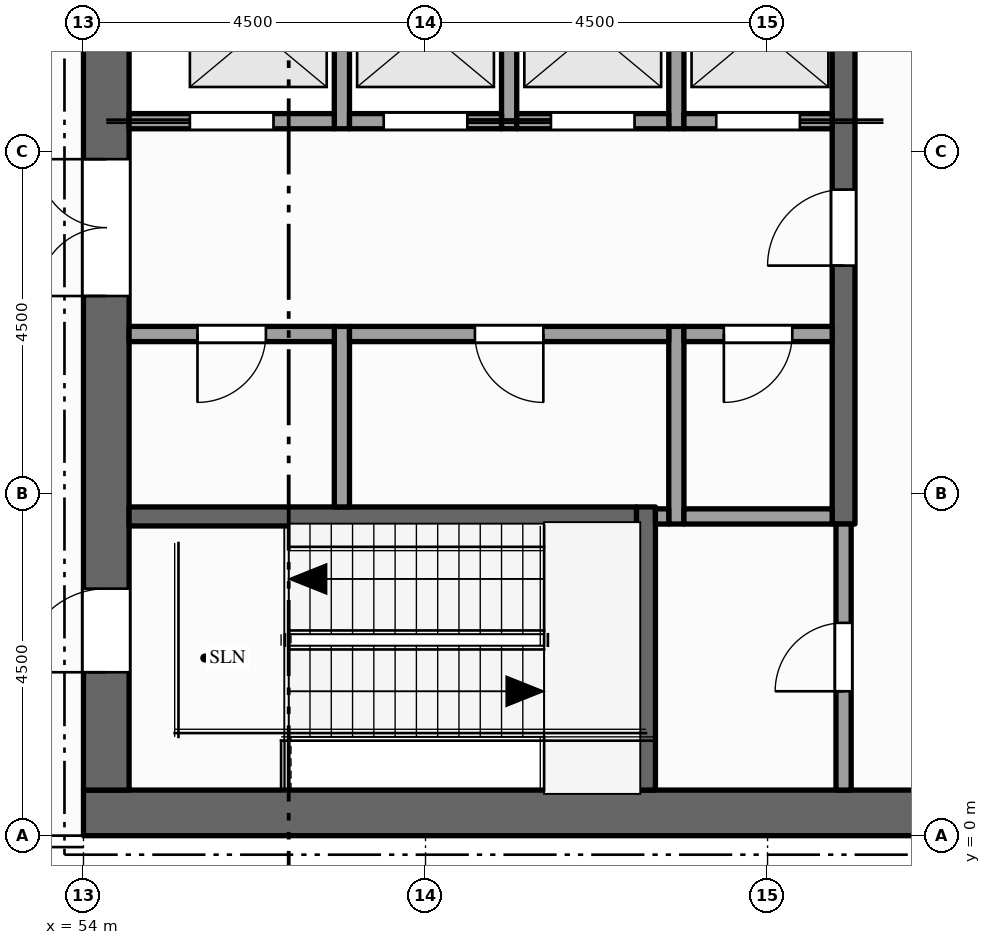
"""IFC4 building model, lengths in metres.
Left out: names, types, materials, properties, quantities, classifications, styles, units other than length and angle.
Written with IfcOpenShell. Run it as: python <this file> out.ifc"""

import sys

from ifc_helpers import new_model, si_unit, direction, frame, frame_2d, origin, place, context, subcontext, project, spatial, rectangle, extrude, element, fill, save


model = new_model("IFC4")
c1 = context("Model", 3, precision=1e-05, world=origin(), true_north=direction((0.0, 1.0)))
c2 = subcontext(c1, "Body", "Model", "MODEL_VIEW")
j1 = project(units=[si_unit("LENGTHUNIT", "METRE"), si_unit("PLANEANGLEUNIT", "RADIAN")], contexts=[c1])
p1 = place(None, origin())
s1 = spatial("IfcSite", under=j1, at=p1, CompositionType="ELEMENT")
p2 = place(p1, origin())
s2 = spatial("IfcBuilding", under=s1, at=p2, CompositionType="ELEMENT")
p3 = place(p2, frame((0.0, 0.0, 314.0)))
s3 = spatial("IfcBuildingStorey", under=s2, at=p3, CompositionType="ELEMENT", Elevation=314.0)
p4 = place(p3, frame((67.5, 0.3, -0.15), z_axis=(0.0, 0.0, 1.0), x_axis=(-1.0, 0.0, 0.0)))
e1 = element("IfcWall", 1, at=p4, inside=s3, PredefinedType="SHEAR", context=c2, shape_type="SweptSolid", body=[
    extrude(rectangle(XDim=13.5, YDim=0.6, at=frame_2d((6.75, 0.0))), origin(), (0.0, 0.0, 1.0), 4.5),
])
p5 = place(p3, frame((54.3, 0.6, -0.15), z_axis=(0.0, 0.0, 1.0), x_axis=(0.0, 1.0, 0.0)))
e2 = element("IfcWall", 2, at=p5, inside=s3, PredefinedType="SHEAR", context=c2, shape_type="SweptSolid", body=[
    extrude(rectangle(XDim=21.3, YDim=0.6, at=frame_2d((10.65, 0.0))), origin(), (0.0, 0.0, 1.0), 4.5),
])
p6 = place(p5, frame((6.5, 0.0, 0.15)))
e3 = element("IfcOpeningElement", 3, at=p6, cuts=e2, PredefinedType="OPENING", context=c2, shape_type="SweptSolid", body=[
    extrude(rectangle(XDim=1.8, YDim=2.1, at=frame_2d((0.9, 1.05))), frame((0.0, 0.31, 0.0), z_axis=(0.0, -1.0, 0.0), x_axis=(1.0, 0.0, 0.0)), (0.0, 0.0, 1.0), 0.62),
])
p7 = place(p5, frame((12.55, 0.0, 0.15)))
e4 = element("IfcOpeningElement", 4, at=p7, cuts=e2, PredefinedType="OPENING", context=c2, shape_type="SweptSolid", body=[
    extrude(rectangle(XDim=1.1, YDim=2.1, at=frame_2d((0.55, 1.05))), frame((0.0, 0.31, 0.0), z_axis=(0.0, -1.0, 0.0), x_axis=(1.0, 0.0, 0.0)), (0.0, 0.0, 1.0), 0.62),
])
p8 = place(p5, frame((1.55, 0.0, 0.15)))
e5 = element("IfcOpeningElement", 5, at=p8, cuts=e2, PredefinedType="OPENING", context=c2, shape_type="SweptSolid", body=[
    extrude(rectangle(XDim=1.1, YDim=2.1, at=frame_2d((0.55, 1.05))), frame((0.0, 0.31, 0.0), z_axis=(0.0, -1.0, 0.0), x_axis=(1.0, 0.0, 0.0)), (0.0, 0.0, 1.0), 0.62),
])
p9 = place(p5, frame((18.75, 0.0, 0.15)))
e6 = element("IfcOpeningElement", 6, at=p9, cuts=e2, PredefinedType="OPENING", context=c2, shape_type="SweptSolid", body=[
    extrude(rectangle(XDim=1.1, YDim=2.1, at=frame_2d((0.55, 1.05))), frame((0.0, 0.31, 0.0), z_axis=(0.0, -1.0, 0.0), x_axis=(1.0, 0.0, 0.0)), (0.0, 0.0, 1.0), 0.62),
])
p10 = place(p3, frame((57.4, 4.325, 0.0), z_axis=(0.0, 0.0, 1.0), x_axis=(0.0, 1.0, 0.0)))
e7 = element("IfcWall", 7, at=p10, inside=s3, PredefinedType="PARTITIONING", context=c2, shape_type="SweptSolid", body=[
    extrude(rectangle(XDim=2.375, YDim=0.2, at=frame_2d((1.188, 0.0))), origin(), (0.0, 0.0, 1.0), 4.35),
])
for number, where, z_axis, x_axis in (
    (8, (57.4, 9.3, 0.0), (0.0, 0.0, 1.0), (0.0, 1.0, 0.0)),
    (9, (59.6, 9.3, 0.0), (0.0, 0.0, 1.0), (0.0, 1.0, 0.0)),
):
    element("IfcWall", number, at=place(p3, frame(where, z_axis=z_axis, x_axis=x_axis)), inside=s3, PredefinedType="SOLIDWALL", context=c2, shape_type="SweptSolid", body=[
        extrude(rectangle(XDim=2.6, YDim=0.2, at=frame_2d((1.3, 0.0))), origin(), (0.0, 0.0, 1.0), 4.35),
    ])
p11 = place(p3, frame((61.4, 0.6, 0.0), z_axis=(0.0, 0.0, 1.0), x_axis=(0.0, 1.0, 0.0)))
e10 = element("IfcWall", 10, at=p11, inside=s3, PredefinedType="SHEAR", context=c2, shape_type="SweptSolid", body=[
    extrude(rectangle(XDim=3.725, YDim=0.25, at=frame_2d((1.862, 0.0))), origin(), (0.0, 0.0, 1.0), 4.35),
])
p12 = place(p3, frame((61.8, 4.1, 0.0), z_axis=(0.0, 0.0, 1.0), x_axis=(0.0, 1.0, 0.0)))
e11 = element("IfcWall", 11, at=p12, inside=s3, PredefinedType="PARTITIONING", context=c2, shape_type="SweptSolid", body=[
    extrude(rectangle(XDim=2.6, YDim=0.2, at=frame_2d((1.3, 0.0))), origin(), (0.0, 0.0, 1.0), 4.35),
])
p13 = place(p3, frame((61.8, 9.3, 0.0), z_axis=(0.0, 0.0, 1.0), x_axis=(0.0, 1.0, 0.0)))
e12 = element("IfcWall", 12, at=p13, inside=s3, PredefinedType="SOLIDWALL", context=c2, shape_type="SweptSolid", body=[
    extrude(rectangle(XDim=2.6, YDim=0.2, at=frame_2d((1.3, 0.0))), origin(), (0.0, 0.0, 1.0), 4.35),
])
p14 = place(p3, frame((64.0, 0.6, 0.0), z_axis=(0.0, 0.0, 1.0), x_axis=(0.0, 1.0, 0.0)))
e13 = element("IfcWall", 13, at=p14, inside=s3, PredefinedType="PARTITIONING", context=c2, shape_type="SweptSolid", body=[
    extrude(rectangle(XDim=3.5, YDim=0.2, at=frame_2d((1.75, 0.0))), origin(), (0.0, 0.0, 1.0), 4.35),
])
p15 = place(p14, frame((1.3, 0.0, 0.0)))
e14 = element("IfcOpeningElement", 14, at=p15, cuts=e13, PredefinedType="OPENING", context=c2, shape_type="SweptSolid", body=[
    extrude(rectangle(XDim=0.9, YDim=2.1, at=frame_2d((0.45, 1.05))), frame((0.0, 0.11, 0.0), z_axis=(0.0, -1.0, 0.0), x_axis=(1.0, 0.0, 0.0)), (0.0, 0.0, 1.0), 0.22),
])
p16 = place(p3, frame((64.0, 4.1, 0.0), z_axis=(0.0, 0.0, 1.0), x_axis=(0.0, 1.0, 0.0)))
e15 = element("IfcWall", 15, at=p16, inside=s3, PredefinedType="SHEAR", context=c2, shape_type="SweptSolid", body=[
    extrude(rectangle(XDim=14.5, YDim=0.3, at=frame_2d((7.25, 0.0))), origin(), (0.0, 0.0, 1.0), 4.35),
])
p17 = place(p16, frame((3.4, 0.0, 0.0)))
e16 = element("IfcOpeningElement", 16, at=p17, cuts=e15, PredefinedType="OPENING", context=c2, shape_type="SweptSolid", body=[
    extrude(rectangle(XDim=1.0, YDim=2.1, at=frame_2d((0.5, 1.05))), frame((0.0, 0.16, 0.0), z_axis=(0.0, -1.0, 0.0), x_axis=(1.0, 0.0, 0.0)), (0.0, 0.0, 1.0), 0.32),
])
p18 = place(p16, frame((9.1, 0.0, 0.0)))
e17 = element("IfcOpeningElement", 17, at=p18, cuts=e15, PredefinedType="OPENING", context=c2, shape_type="SweptSolid", body=[
    extrude(rectangle(XDim=1.0, YDim=2.1, at=frame_2d((0.5, 1.05))), frame((0.0, 0.16, 0.0), z_axis=(0.0, -1.0, 0.0), x_axis=(1.0, 0.0, 0.0)), (0.0, 0.0, 1.0), 0.32),
])
p19 = place(p3, frame((54.6, 4.2, 0.0), z_axis=(0.0, 0.0, 1.0), x_axis=(1.0, 0.0, 0.0)))
e18 = element("IfcWall", 18, at=p19, inside=s3, PredefinedType="SHEAR", context=c2, shape_type="SweptSolid", body=[
    extrude(rectangle(XDim=6.675, YDim=0.25, at=frame_2d((3.337, 0.0))), origin(), (0.0, 0.0, 1.0), 4.35),
])
p20 = place(p3, frame((61.525, 4.2, 0.0), z_axis=(0.0, 0.0, 1.0), x_axis=(1.0, 0.0, 0.0)))
e19 = element("IfcWall", 19, at=p20, inside=s3, PredefinedType="PARTITIONING", context=c2, shape_type="SweptSolid", body=[
    extrude(rectangle(XDim=0.175, YDim=0.2, at=frame_2d((0.087, 0.0))), origin(), (0.0, 0.0, 1.0), 4.35),
])
p21 = place(p3, frame((61.9, 4.2, 0.0), z_axis=(0.0, 0.0, 1.0), x_axis=(1.0, 0.0, 0.0)))
e20 = element("IfcWall", 20, at=p21, inside=s3, PredefinedType="PARTITIONING", context=c2, shape_type="SweptSolid", body=[
    extrude(rectangle(XDim=1.95, YDim=0.2, at=frame_2d((0.975, 0.0))), origin(), (0.0, 0.0, 1.0), 4.35),
])
p22 = place(p3, frame((54.6, 6.6, 0.0), z_axis=(0.0, 0.0, 1.0), x_axis=(1.0, 0.0, 0.0)))
e21 = element("IfcWall", 21, at=p22, inside=s3, PredefinedType="PARTITIONING", context=c2, shape_type="SweptSolid", body=[
    extrude(rectangle(XDim=2.7, YDim=0.2, at=frame_2d((1.35, 0.0))), origin(), (0.0, 0.0, 1.0), 4.35),
])
p23 = place(p22, frame((0.9, 0.0, 0.0)))
e22 = element("IfcOpeningElement", 22, at=p23, cuts=e21, PredefinedType="OPENING", context=c2, shape_type="SweptSolid", body=[
    extrude(rectangle(XDim=0.9, YDim=2.1, at=frame_2d((0.45, 1.05))), frame((0.0, 0.11, 0.0), z_axis=(0.0, -1.0, 0.0), x_axis=(1.0, 0.0, 0.0)), (0.0, 0.0, 1.0), 0.22),
])
p24 = place(p3, frame((57.5, 6.6, 0.0), z_axis=(0.0, 0.0, 1.0), x_axis=(1.0, 0.0, 0.0)))
e23 = element("IfcWall", 23, at=p24, inside=s3, PredefinedType="PARTITIONING", context=c2, shape_type="SweptSolid", body=[
    extrude(rectangle(XDim=4.2, YDim=0.2, at=frame_2d((2.1, 0.0))), origin(), (0.0, 0.0, 1.0), 4.35),
])
p25 = place(p24, frame((1.65, 0.0, 0.0)))
e24 = element("IfcOpeningElement", 24, at=p25, cuts=e23, PredefinedType="OPENING", context=c2, shape_type="SweptSolid", body=[
    extrude(rectangle(XDim=0.9, YDim=2.1, at=frame_2d((0.45, 1.05))), frame((0.0, 0.11, 0.0), z_axis=(0.0, -1.0, 0.0), x_axis=(1.0, 0.0, 0.0)), (0.0, 0.0, 1.0), 0.22),
])
p26 = place(p3, frame((61.9, 6.6, 0.0), z_axis=(0.0, 0.0, 1.0), x_axis=(1.0, 0.0, 0.0)))
e25 = element("IfcWall", 25, at=p26, inside=s3, PredefinedType="PARTITIONING", context=c2, shape_type="SweptSolid", body=[
    extrude(rectangle(XDim=1.95, YDim=0.2, at=frame_2d((0.975, 0.0))), origin(), (0.0, 0.0, 1.0), 4.35),
])
p27 = place(p26, frame((0.525, 0.0, 0.0)))
e26 = element("IfcOpeningElement", 26, at=p27, cuts=e25, PredefinedType="OPENING", context=c2, shape_type="SweptSolid", body=[
    extrude(rectangle(XDim=0.9, YDim=2.1, at=frame_2d((0.45, 1.05))), frame((0.0, 0.11, 0.0), z_axis=(0.0, -1.0, 0.0), x_axis=(1.0, 0.0, 0.0)), (0.0, 0.0, 1.0), 0.22),
])
p28 = place(p3, frame((54.6, 9.4, 0.0), z_axis=(0.0, 0.0, 1.0), x_axis=(1.0, 0.0, 0.0)))
e27 = element("IfcWall", 27, at=p28, inside=s3, PredefinedType="SOLIDWALL", context=c2, shape_type="SweptSolid", body=[
    extrude(rectangle(XDim=2.7, YDim=0.2, at=frame_2d((1.35, 0.0))), origin(), (0.0, 0.0, 1.0), 4.35),
])
p29 = place(p28, frame((0.8, 0.0, 0.012)))
e28 = element("IfcOpeningElement", 28, at=p29, cuts=e27, PredefinedType="OPENING", context=c2, shape_type="SweptSolid", body=[
    extrude(rectangle(XDim=1.1, YDim=2.1, at=frame_2d((0.55, 1.05))), frame((0.0, 0.11, 0.0), z_axis=(0.0, -1.0, 0.0), x_axis=(1.0, 0.0, 0.0)), (0.0, 0.0, 1.0), 0.22),
])
p30 = place(p3, frame((57.5, 9.4, 0.0), z_axis=(0.0, 0.0, 1.0), x_axis=(1.0, 0.0, 0.0)))
e29 = element("IfcWall", 29, at=p30, inside=s3, PredefinedType="SOLIDWALL", context=c2, shape_type="SweptSolid", body=[
    extrude(rectangle(XDim=2.0, YDim=0.2, at=frame_2d((1.0, 0.0))), origin(), (0.0, 0.0, 1.0), 4.35),
])
p31 = place(p30, frame((0.45, 0.0, 0.012)))
e30 = element("IfcOpeningElement", 30, at=p31, cuts=e29, PredefinedType="OPENING", context=c2, shape_type="SweptSolid", body=[
    extrude(rectangle(XDim=1.1, YDim=2.1, at=frame_2d((0.55, 1.05))), frame((0.0, 0.11, 0.0), z_axis=(0.0, -1.0, 0.0), x_axis=(1.0, 0.0, 0.0)), (0.0, 0.0, 1.0), 0.22),
])
p32 = place(p3, frame((59.7, 9.4, 0.0), z_axis=(0.0, 0.0, 1.0), x_axis=(1.0, 0.0, 0.0)))
e31 = element("IfcWall", 31, at=p32, inside=s3, PredefinedType="SOLIDWALL", context=c2, shape_type="SweptSolid", body=[
    extrude(rectangle(XDim=2.0, YDim=0.2, at=frame_2d((1.0, 0.0))), origin(), (0.0, 0.0, 1.0), 4.35),
])
p33 = place(p32, frame((0.45, 0.0, 0.012)))
e32 = element("IfcOpeningElement", 32, at=p33, cuts=e31, PredefinedType="OPENING", context=c2, shape_type="SweptSolid", body=[
    extrude(rectangle(XDim=1.1, YDim=2.1, at=frame_2d((0.55, 1.05))), frame((0.0, 0.11, 0.0), z_axis=(0.0, -1.0, 0.0), x_axis=(1.0, 0.0, 0.0)), (0.0, 0.0, 1.0), 0.22),
])
p34 = place(p3, frame((61.9, 9.4, 0.0), z_axis=(0.0, 0.0, 1.0), x_axis=(1.0, 0.0, 0.0)))
e33 = element("IfcWall", 33, at=p34, inside=s3, PredefinedType="SOLIDWALL", context=c2, shape_type="SweptSolid", body=[
    extrude(rectangle(XDim=1.95, YDim=0.2, at=frame_2d((0.975, 0.0))), origin(), (0.0, 0.0, 1.0), 4.35),
])
p35 = place(p34, frame((0.425, 0.0, 0.012)))
e34 = element("IfcOpeningElement", 34, at=p35, cuts=e33, PredefinedType="OPENING", context=c2, shape_type="SweptSolid", body=[
    extrude(rectangle(XDim=1.1, YDim=2.1, at=frame_2d((0.55, 1.05))), frame((0.0, 0.11, 0.0), z_axis=(0.0, -1.0, 0.0), x_axis=(1.0, 0.0, 0.0)), (0.0, 0.0, 1.0), 0.22),
])
p36 = place(p29, origin())
e35 = element("IfcDoor", 35, at=p36, inside=s3, OperationType="SLIDING_TO_LEFT", PredefinedType="DOOR", context=c2, shape_type="SweptSolid", body=[
    extrude(rectangle(XDim=1.1, YDim=2.1, at=frame_2d((0.55, 1.05))), frame((0.0, 0.025, 0.0), z_axis=(0.0, -1.0, 0.0), x_axis=(1.0, 0.0, 0.0)), (0.0, 0.0, 1.0), 0.05),
])
fill(e28, e35)
p37 = place(p31, origin())
e36 = element("IfcDoor", 36, at=p37, inside=s3, OperationType="SLIDING_TO_RIGHT", PredefinedType="DOOR", context=c2, shape_type="SweptSolid", body=[
    extrude(rectangle(XDim=1.1, YDim=2.1, at=frame_2d((0.55, 1.05))), frame((0.0, 0.025, 0.0), z_axis=(0.0, -1.0, 0.0), x_axis=(1.0, 0.0, 0.0)), (0.0, 0.0, 1.0), 0.05),
])
fill(e30, e36)
p38 = place(p33, origin())
e37 = element("IfcDoor", 37, at=p38, inside=s3, OperationType="SLIDING_TO_LEFT", PredefinedType="DOOR", context=c2, shape_type="SweptSolid", body=[
    extrude(rectangle(XDim=1.1, YDim=2.1, at=frame_2d((0.55, 1.05))), frame((0.0, 0.025, 0.0), z_axis=(0.0, -1.0, 0.0), x_axis=(1.0, 0.0, 0.0)), (0.0, 0.0, 1.0), 0.05),
])
fill(e32, e37)
p39 = place(p35, origin())
e38 = element("IfcDoor", 38, at=p39, inside=s3, OperationType="SLIDING_TO_RIGHT", PredefinedType="DOOR", context=c2, shape_type="SweptSolid", body=[
    extrude(rectangle(XDim=1.1, YDim=2.1, at=frame_2d((0.55, 1.05))), frame((0.0, 0.025, 0.0), z_axis=(0.0, -1.0, 0.0), x_axis=(1.0, 0.0, 0.0)), (0.0, 0.0, 1.0), 0.05),
])
fill(e34, e38)
p40 = place(p6, origin())
e39 = element("IfcDoor", 39, at=p40, inside=s3, OperationType="DOUBLE_DOOR_SINGLE_SWING", PredefinedType="DOOR", context=c2, shape_type="SweptSolid", body=[
    extrude(rectangle(XDim=1.8, YDim=2.1, at=frame_2d((0.9, 1.05))), frame((0.0, 0.025, 0.0), z_axis=(0.0, -1.0, 0.0), x_axis=(1.0, 0.0, 0.0)), (0.0, 0.0, 1.0), 0.05),
])
fill(e3, e39)
p41 = place(p17, origin())
e40 = element("IfcDoor", 40, at=p41, inside=s3, OperationType="SINGLE_SWING_LEFT", PredefinedType="DOOR", context=c2, shape_type="SweptSolid", body=[
    extrude(rectangle(XDim=1.0, YDim=2.1, at=frame_2d((0.5, 1.05))), frame((0.0, 0.025, 0.0), z_axis=(0.0, -1.0, 0.0), x_axis=(1.0, 0.0, 0.0)), (0.0, 0.0, 1.0), 0.05),
])
fill(e16, e40)
p42 = place(p8, origin())
e41 = element("IfcDoor", 41, at=p42, inside=s3, OperationType="SINGLE_SWING_LEFT", PredefinedType="DOOR", context=c2, shape_type="SweptSolid", body=[
    extrude(rectangle(XDim=1.1, YDim=2.1, at=frame_2d((0.55, 1.05))), frame((0.0, 0.025, 0.0), z_axis=(0.0, -1.0, 0.0), x_axis=(1.0, 0.0, 0.0)), (0.0, 0.0, 1.0), 0.05),
])
fill(e5, e41)
p43 = place(p15, origin())
e42 = element("IfcDoor", 42, at=p43, inside=s3, OperationType="SINGLE_SWING_LEFT", PredefinedType="DOOR", context=c2, shape_type="SweptSolid", body=[
    extrude(rectangle(XDim=0.9, YDim=2.1, at=frame_2d((0.45, 1.05))), frame((0.0, 0.025, 0.0), z_axis=(0.0, -1.0, 0.0), x_axis=(1.0, 0.0, 0.0)), (0.0, 0.0, 1.0), 0.05),
])
fill(e14, e42)
p44 = place(p23, origin())
e43 = element("IfcDoor", 43, at=p44, inside=s3, OperationType="SINGLE_SWING_LEFT", PredefinedType="DOOR", context=c2, shape_type="SweptSolid", body=[
    extrude(rectangle(XDim=0.9, YDim=2.1, at=frame_2d((0.45, 1.05))), frame((0.0, 0.025, 0.0), z_axis=(0.0, -1.0, 0.0), x_axis=(1.0, 0.0, 0.0)), (0.0, 0.0, 1.0), 0.05),
])
fill(e22, e43)
p45 = place(p25, origin())
e44 = element("IfcDoor", 44, at=p45, inside=s3, OperationType="SINGLE_SWING_RIGHT", PredefinedType="DOOR", context=c2, shape_type="SweptSolid", body=[
    extrude(rectangle(XDim=0.9, YDim=2.1, at=frame_2d((0.45, 1.05))), frame((0.0, 0.025, 0.0), z_axis=(0.0, -1.0, 0.0), x_axis=(1.0, 0.0, 0.0)), (0.0, 0.0, 1.0), 0.05),
])
fill(e24, e44)
p46 = place(p27, origin())
e45 = element("IfcDoor", 45, at=p46, inside=s3, OperationType="SINGLE_SWING_LEFT", PredefinedType="DOOR", context=c2, shape_type="SweptSolid", body=[
    extrude(rectangle(XDim=0.9, YDim=2.1, at=frame_2d((0.45, 1.05))), frame((0.0, 0.025, 0.0), z_axis=(0.0, -1.0, 0.0), x_axis=(1.0, 0.0, 0.0)), (0.0, 0.0, 1.0), 0.05),
])
fill(e26, e45)
save(model, sys.argv[1])
